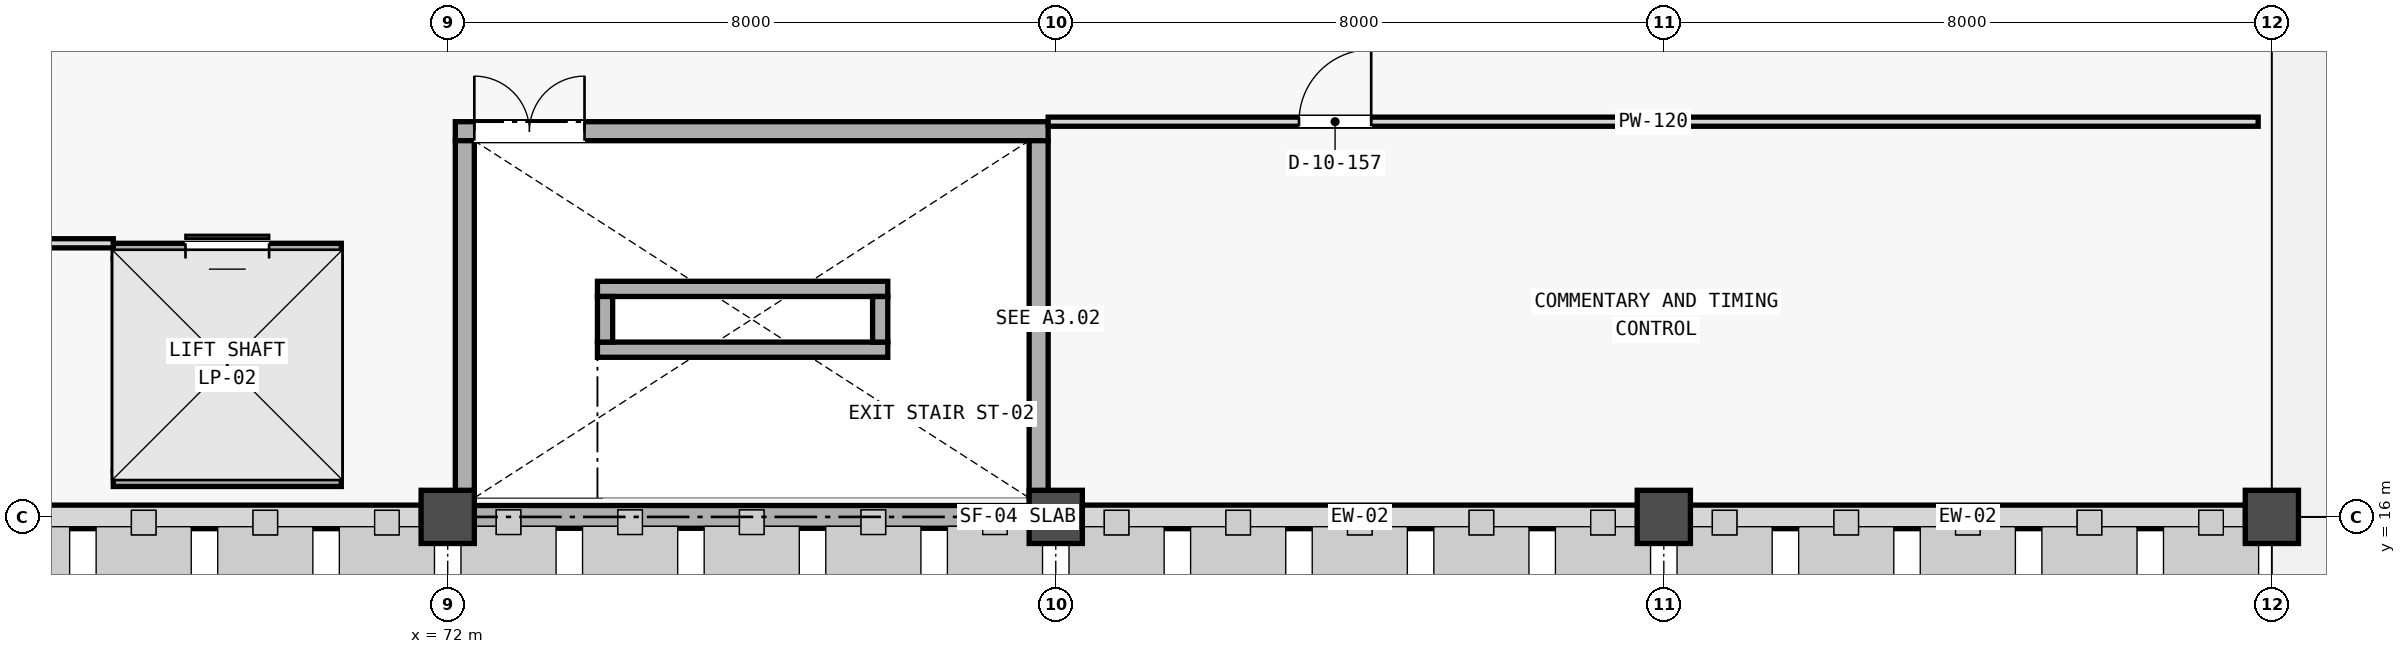
"""IFC4 building model, lengths in metres.
Left out: names, types, materials, properties, quantities, classifications, styles, units other than length and angle.
Written with IfcOpenShell. Run it as: python <this file> out.ifc"""

import sys

from ifc_helpers import new_model, si_unit, direction, frame, frame_2d, origin, origin_2d, place, context, subcontext, project, spatial, rectangle, extrude, element, fill, save


model = new_model("IFC4")
c1 = context("Model", 3, precision=1e-05, world=origin(), true_north=direction((0.0, 1.0)))
c2 = subcontext(c1, "Body", "Model", "MODEL_VIEW")
j1 = project(units=[si_unit("LENGTHUNIT", "METRE"), si_unit("PLANEANGLEUNIT", "RADIAN")], contexts=[c1])
p1 = place(None, origin())
s1 = spatial("IfcSite", under=j1, at=p1, CompositionType="ELEMENT")
p2 = place(p1, origin())
s2 = spatial("IfcBuilding", under=s1, at=p2, CompositionType="ELEMENT")
p3 = place(p2, frame((0.0, 0.0, 10.2)))
s3 = spatial("IfcBuildingStorey", under=s2, at=p3, CompositionType="ELEMENT", Elevation=10.2)
p4 = place(p3, frame((72.0, 16.0, 0.0), z_axis=(0.0, 0.0, 1.0), x_axis=(1.0, 0.0, 0.0)))
e1 = element("IfcColumn", 1, at=p4, inside=s3, PredefinedType="COLUMN", context=c2, shape_type="SweptSolid", body=[
    extrude(rectangle(XDim=0.7, YDim=0.7, at=origin_2d()), origin(), (0.0, 0.0, 1.0), 7.325),
])
p5 = place(p3, frame((80.0, 16.0, 0.0), z_axis=(0.0, 0.0, 1.0), x_axis=(1.0, 0.0, 0.0)))
e2 = element("IfcColumn", 2, at=p5, inside=s3, PredefinedType="COLUMN", context=c2, shape_type="SweptSolid", body=[
    extrude(rectangle(XDim=0.7, YDim=0.7, at=origin_2d()), origin(), (0.0, 0.0, 1.0), 6.625),
])
p6 = place(p3, frame((88.0, 16.0, 0.0), z_axis=(0.0, 0.0, 1.0), x_axis=(1.0, 0.0, 0.0)))
e3 = element("IfcColumn", 3, at=p6, inside=s3, PredefinedType="COLUMN", context=c2, shape_type="SweptSolid", body=[
    extrude(rectangle(XDim=0.7, YDim=0.7, at=origin_2d()), origin(), (0.0, 0.0, 1.0), 5.725),
])
p7 = place(p3, frame((96.0, 16.0, 0.0), z_axis=(0.0, 0.0, 1.0), x_axis=(1.0, 0.0, 0.0)))
e4 = element("IfcColumn", 4, at=p7, inside=s3, PredefinedType="COLUMN", context=c2, shape_type="SweptSolid", body=[
    extrude(rectangle(XDim=0.7, YDim=0.7, at=origin_2d()), origin(), (0.0, 0.0, 1.0), 4.625),
])
p8 = place(p3, frame((64.346, 16.0, 0.0), z_axis=(0.0, 0.0, 1.0), x_axis=(1.0, 0.0, 0.0)))
e5 = element("IfcWall", 5, at=p8, inside=s3, PredefinedType="STANDARD", context=c2, shape_type="SweptSolid", body=[
    extrude(rectangle(XDim=7.308, YDim=0.31, at=frame_2d((3.654, 0.0))), origin(), (0.0, 0.0, 1.0), 3.39),
])
p9 = place(p3, frame((72.346, 16.0, 0.0), z_axis=(0.0, 0.0, 1.0), x_axis=(1.0, 0.0, 0.0)))
e6 = element("IfcWall", 6, at=p9, inside=s3, PredefinedType="SHEAR", context=c2, shape_type="SweptSolid", body=[
    extrude(rectangle(XDim=7.308, YDim=0.3, at=frame_2d((3.654, 0.0))), origin(), (0.0, 0.0, 1.0), 4.2),
])
for number, where, z_axis, x_axis in (
    (7, (80.346, 16.0, 0.0), (0.0, 0.0, 1.0), (1.0, 0.0, 0.0)),
    (8, (88.346, 16.0, 0.0), (0.0, 0.0, 1.0), (1.0, 0.0, 0.0)),
):
    element("IfcWall", number, at=place(p3, frame(where, z_axis=z_axis, x_axis=x_axis)), inside=s3, PredefinedType="STANDARD", context=c2, shape_type="SweptSolid", body=[
        extrude(rectangle(XDim=7.308, YDim=0.31, at=frame_2d((3.654, 0.0))), origin(), (0.0, 0.0, 1.0), 3.39),
    ])
p10 = place(p3, frame((72.1, 21.075, 0.0), z_axis=(0.0, 0.0, 1.0), x_axis=(1.0, 0.0, 0.0)))
e9 = element("IfcWall", 9, at=p10, inside=s3, PredefinedType="SHEAR", context=c2, shape_type="SweptSolid", body=[
    extrude(rectangle(XDim=7.8, YDim=0.25, at=frame_2d((3.9, 0.0))), origin(), (0.0, 0.0, 1.0), 3.96),
])
p11 = place(p10, frame((0.25, 0.0, 0.0)))
e10 = element("IfcOpeningElement", 10, at=p11, cuts=e9, PredefinedType="OPENING", context=c2, shape_type="SweptSolid", body=[
    extrude(rectangle(XDim=1.45, YDim=2.2, at=frame_2d((0.725, 1.1))), frame((0.0, 0.135, 0.0), z_axis=(0.0, -1.0, 0.0), x_axis=(1.0, 0.0, 0.0)), (0.0, 0.0, 1.0), 0.27),
])
for number, where, z_axis, x_axis in (
    (11, (72.225, 16.25, 0.0), (0.0, 0.0, 1.0), (0.0, 1.0, 0.0)),
    (12, (79.775, 16.25, 0.0), (0.0, 0.0, 1.0), (0.0, 1.0, 0.0)),
):
    element("IfcWall", number, at=place(p3, frame(where, z_axis=z_axis, x_axis=x_axis)), inside=s3, PredefinedType="SHEAR", context=c2, shape_type="SweptSolid", body=[
        extrude(rectangle(XDim=4.7, YDim=0.25, at=frame_2d((2.35, 0.0))), origin(), (0.0, 0.0, 1.0), 3.96),
    ])
for number, where, z_axis, x_axis in (
    (13, (73.97, 18.2, 0.0), (0.0, 0.0, 1.0), (1.0, 0.0, 0.0)),
    (14, (73.97, 19.0, 0.0), (0.0, 0.0, 1.0), (1.0, 0.0, 0.0)),
):
    element("IfcWall", number, at=place(p3, frame(where, z_axis=z_axis, x_axis=x_axis)), inside=s3, PredefinedType="SHEAR", context=c2, shape_type="SweptSolid", body=[
        extrude(rectangle(XDim=3.82, YDim=0.2, at=frame_2d((1.91, 0.0))), origin(), (0.0, 0.0, 1.0), 3.96),
    ])
for number, where, z_axis, x_axis in (
    (15, (74.07, 18.3, 0.0), (0.0, 0.0, 1.0), (0.0, 1.0, 0.0)),
    (16, (77.69, 18.3, 0.0), (0.0, 0.0, 1.0), (0.0, 1.0, 0.0)),
):
    element("IfcWall", number, at=place(p3, frame(where, z_axis=z_axis, x_axis=x_axis)), inside=s3, PredefinedType="SHEAR", context=c2, shape_type="SweptSolid", body=[
        extrude(rectangle(XDim=0.6, YDim=0.2, at=frame_2d((0.3, 0.0))), origin(), (0.0, 0.0, 1.0), 3.96),
    ])
p12 = place(p3, frame((67.6, 16.5, 0.0), z_axis=(0.0, 0.0, 1.0), x_axis=(1.0, 0.0, 0.0)))
e17 = element("IfcWall", 17, at=p12, inside=s3, PredefinedType="SHEAR", context=c2, shape_type="SweptSolid", body=[
    extrude(rectangle(XDim=3.0, YDim=0.2, at=frame_2d((1.5, 0.0))), origin(), (0.0, 0.0, 1.0), 3.96),
])
p13 = place(p3, frame((67.6, 19.5, 0.0), z_axis=(0.0, 0.0, 1.0), x_axis=(1.0, 0.0, 0.0)))
e18 = element("IfcWall", 18, at=p13, inside=s3, PredefinedType="SHEAR", context=c2, shape_type="SweptSolid", body=[
    extrude(rectangle(XDim=3.0, YDim=0.2, at=frame_2d((1.5, 0.0))), origin(), (0.0, 0.0, 1.0), 3.96),
])
p14 = place(p13, frame((0.95, 0.0, 0.0)))
e19 = element("IfcOpeningElement", 19, at=p14, cuts=e18, PredefinedType="OPENING", context=c2, shape_type="SweptSolid", body=[
    extrude(rectangle(XDim=1.1, YDim=2.2, at=frame_2d((0.55, 1.1))), frame((0.0, 0.11, 0.0), z_axis=(0.0, -1.0, 0.0), x_axis=(1.0, 0.0, 0.0)), (0.0, 0.0, 1.0), 0.22),
])
for number, where, z_axis, x_axis in (
    (20, (67.7, 16.6, 0.0), (0.0, 0.0, 1.0), (0.0, 1.0, 0.0)),
    (21, (70.5, 16.6, 0.0), (0.0, 0.0, 1.0), (0.0, 1.0, 0.0)),
):
    element("IfcWall", number, at=place(p3, frame(where, z_axis=z_axis, x_axis=x_axis)), inside=s3, PredefinedType="SHEAR", context=c2, shape_type="SweptSolid", body=[
        extrude(rectangle(XDim=2.8, YDim=0.2, at=frame_2d((1.4, 0.0))), origin(), (0.0, 0.0, 1.0), 3.96),
    ])
p15 = place(p3, frame((36.4, 19.6, 0.0), z_axis=(0.0, 0.0, 1.0), x_axis=(1.0, 0.0, 0.0)))
e22 = element("IfcWall", 22, at=p15, inside=s3, PredefinedType="PARTITIONING", context=c2, shape_type="SweptSolid", body=[
    extrude(rectangle(XDim=31.2, YDim=0.12, at=frame_2d((15.6, 0.0))), origin(), (0.0, 0.0, 1.0), 3.945),
])
p16 = place(p15, frame((6.1, 0.0, 0.0)))
e23 = element("IfcOpeningElement", 23, at=p16, cuts=e22, PredefinedType="OPENING", context=c2, shape_type="SweptSolid", body=[
    extrude(rectangle(XDim=2.0, YDim=2.4, at=frame_2d((1.0, 1.2))), frame((0.0, 0.07, 0.0), z_axis=(0.0, -1.0, 0.0), x_axis=(1.0, 0.0, 0.0)), (0.0, 0.0, 1.0), 0.14),
])
p17 = place(p15, frame((22.1, 0.0, 0.0)))
e24 = element("IfcOpeningElement", 24, at=p17, cuts=e22, PredefinedType="OPENING", context=c2, shape_type="SweptSolid", body=[
    extrude(rectangle(XDim=2.0, YDim=2.4, at=frame_2d((1.0, 1.2))), frame((0.0, 0.07, 0.0), z_axis=(0.0, -1.0, 0.0), x_axis=(1.0, 0.0, 0.0)), (0.0, 0.0, 1.0), 0.14),
])
p18 = place(p3, frame((79.9, 21.2, 0.0), z_axis=(0.0, 0.0, 1.0), x_axis=(1.0, 0.0, 0.0)))
e25 = element("IfcWall", 25, at=p18, inside=s3, PredefinedType="PARTITIONING", context=c2, shape_type="SweptSolid", body=[
    extrude(rectangle(XDim=15.92, YDim=0.12, at=frame_2d((7.96, 0.0))), origin(), (0.0, 0.0, 1.0), 3.39),
])
p19 = place(p18, frame((3.3, 0.0, 0.0)))
e26 = element("IfcOpeningElement", 26, at=p19, cuts=e25, PredefinedType="OPENING", context=c2, shape_type="SweptSolid", body=[
    extrude(rectangle(XDim=0.95, YDim=2.15, at=frame_2d((0.475, 1.075))), frame((0.0, 0.07, 0.0), z_axis=(0.0, -1.0, 0.0), x_axis=(1.0, 0.0, 0.0)), (0.0, 0.0, 1.0), 0.14),
])
p20 = place(p11, origin())
e27 = element("IfcDoor", 27, at=p20, inside=s3, OperationType="DOUBLE_DOOR_SINGLE_SWING", PredefinedType="DOOR", context=c2, shape_type="SweptSolid", body=[
    extrude(rectangle(XDim=1.45, YDim=2.2, at=frame_2d((0.725, 1.1))), frame((0.0, 0.025, 0.0), z_axis=(0.0, -1.0, 0.0), x_axis=(1.0, 0.0, 0.0)), (0.0, 0.0, 1.0), 0.05),
])
fill(e10, e27)
p21 = place(p14, origin())
e28 = element("IfcDoor", 28, at=p21, inside=s3, OperationType="SLIDING_TO_LEFT", PredefinedType="DOOR", context=c2, shape_type="SweptSolid", body=[
    extrude(rectangle(XDim=1.1, YDim=2.2, at=frame_2d((0.55, 1.1))), frame((0.0, 0.025, 0.0), z_axis=(0.0, -1.0, 0.0), x_axis=(1.0, 0.0, 0.0)), (0.0, 0.0, 1.0), 0.05),
])
fill(e19, e28)
p22 = place(p19, origin())
e29 = element("IfcDoor", 29, at=p22, inside=s3, OperationType="SINGLE_SWING_RIGHT", PredefinedType="DOOR", context=c2, shape_type="SweptSolid", body=[
    extrude(rectangle(XDim=0.95, YDim=2.15, at=frame_2d((0.475, 1.075))), frame((0.0, 0.025, 0.0), z_axis=(0.0, -1.0, 0.0), x_axis=(1.0, 0.0, 0.0)), (0.0, 0.0, 1.0), 0.05),
])
fill(e26, e29)
save(model, sys.argv[1])
